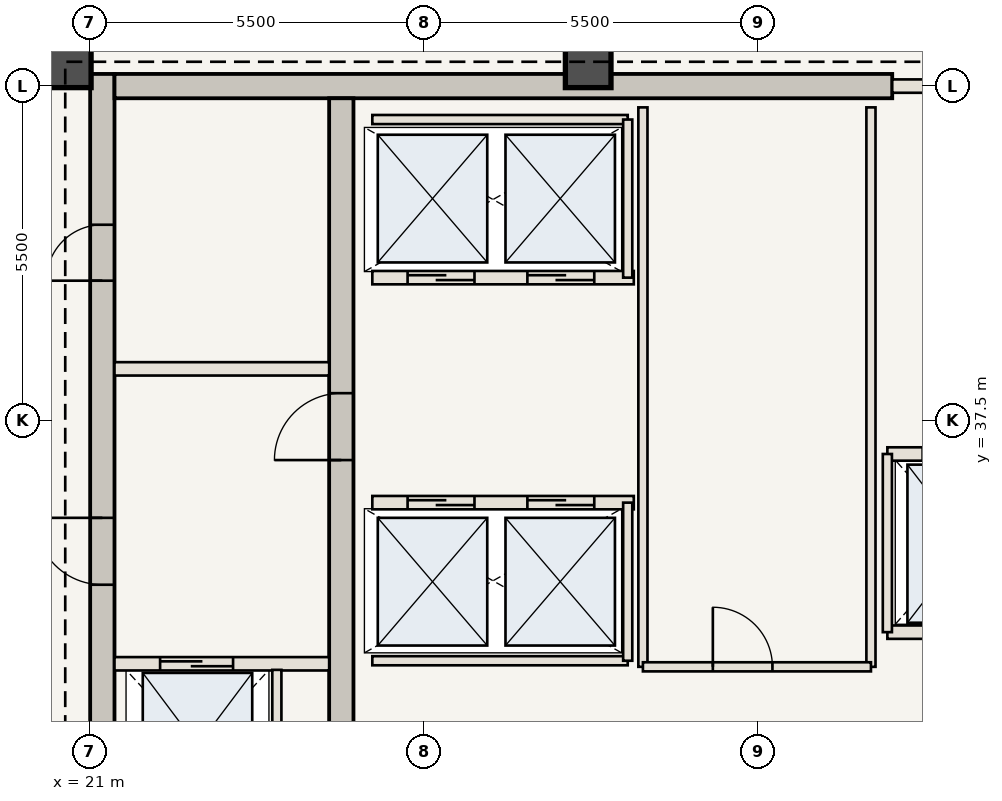
"""IFC4 building model, lengths in metres.
Left out: names, types, materials, properties, quantities, classifications, styles, units other than length and angle.
Written with IfcOpenShell. Run it as: python <this file> out.ifc"""

import sys

from ifc_helpers import new_model, si_unit, direction, frame, frame_2d, origin, origin_2d, place, context, subcontext, project, spatial, rectangle, extrude, element, fill, save


model = new_model("IFC4")
c1 = context("Model", 3, precision=1e-05, world=origin(), true_north=direction((0.0, 1.0)))
c2 = subcontext(c1, "Body", "Model", "MODEL_VIEW")
j1 = project(units=[si_unit("LENGTHUNIT", "METRE"), si_unit("PLANEANGLEUNIT", "RADIAN")], contexts=[c1])
p1 = place(None, origin())
s1 = spatial("IfcSite", under=j1, at=p1, CompositionType="ELEMENT")
p2 = place(p1, origin())
s2 = spatial("IfcBuilding", under=s1, at=p2, CompositionType="ELEMENT")
p3 = place(p2, frame((0.0, 0.0, 308.35)))
s3 = spatial("IfcBuildingStorey", under=s2, at=p3, CompositionType="ELEMENT", Elevation=308.35)
p4 = place(p3, frame((21.21, 30.6, 0.0), z_axis=(0.0, 0.0, 1.0), x_axis=(0.0, 1.0, 0.0)))
e1 = element("IfcWall", 1, at=p4, inside=s3, PredefinedType="SHEAR", context=c2, shape_type="SweptSolid", body=[
    extrude(rectangle(XDim=12.6, YDim=0.4, at=frame_2d((6.3, 0.0))), origin(), (0.0, 0.0, 1.0), 4.9),
])
p5 = place(p4, frame((4.2, 0.0, 0.0)))
e2 = element("IfcOpeningElement", 2, at=p5, cuts=e1, PredefinedType="OPENING", context=c2, shape_type="SweptSolid", body=[
    extrude(rectangle(XDim=1.1, YDim=2.15, at=frame_2d((0.55, 1.075))), frame((0.0, 0.21, 0.0), z_axis=(0.0, -1.0, 0.0), x_axis=(1.0, 0.0, 0.0)), (0.0, 0.0, 1.0), 0.42),
])
p6 = place(p4, frame((9.2, 0.0, 0.0)))
e3 = element("IfcOpeningElement", 3, at=p6, cuts=e1, PredefinedType="OPENING", context=c2, shape_type="SweptSolid", body=[
    extrude(rectangle(XDim=0.92, YDim=2.1, at=frame_2d((0.46, 1.05))), frame((0.0, 0.21, 0.0), z_axis=(0.0, -1.0, 0.0), x_axis=(1.0, 0.0, 0.0)), (0.0, 0.0, 1.0), 0.42),
])
p7 = place(p3, frame((21.41, 43.0, 0.0), z_axis=(0.0, 0.0, 1.0), x_axis=(1.0, 0.0, 0.0)))
e4 = element("IfcWall", 4, at=p7, inside=s3, PredefinedType="SHEAR", context=c2, shape_type="SweptSolid", body=[
    extrude(rectangle(XDim=12.79, YDim=0.4, at=frame_2d((6.395, 0.0))), origin(), (0.0, 0.0, 1.0), 4.9),
])
p8 = place(p3, frame((25.14, 30.6, 0.0), z_axis=(0.0, 0.0, 1.0), x_axis=(0.0, 1.0, 0.0)))
e5 = element("IfcWall", 5, at=p8, inside=s3, PredefinedType="SHEAR", context=c2, shape_type="SweptSolid", body=[
    extrude(rectangle(XDim=12.2, YDim=0.4, at=frame_2d((6.1, 0.0))), origin(), (0.0, 0.0, 1.0), 4.9),
])
p9 = place(p8, frame((6.25, 0.0, 0.0)))
e6 = element("IfcOpeningElement", 6, at=p9, cuts=e5, PredefinedType="OPENING", context=c2, shape_type="SweptSolid", body=[
    extrude(rectangle(XDim=1.1, YDim=2.15, at=frame_2d((0.55, 1.075))), frame((0.0, 0.21, 0.0), z_axis=(0.0, -1.0, 0.0), x_axis=(1.0, 0.0, 0.0)), (0.0, 0.0, 1.0), 0.42),
])
for number, where, z_axis, x_axis in (
    (7, (29.2, 43.35, 0.0), (0.0, 0.0, 1.0), (1.0, 0.0, 0.0)),
    (8, (20.65, 43.35, 0.0), (0.0, 0.0, 1.0), (1.0, 0.0, 0.0)),
):
    element("IfcColumn", number, at=place(p3, frame(where, z_axis=z_axis, x_axis=x_axis)), inside=s3, PredefinedType="COLUMN", context=c2, shape_type="SweptSolid", body=[
        extrude(rectangle(XDim=0.75, YDim=0.75, at=origin_2d()), origin(), (0.0, 0.0, 1.0), 4.9),
    ])
p10 = place(p3, frame((21.41, 33.5, 0.0), z_axis=(0.0, 0.0, 1.0), x_axis=(1.0, 0.0, 0.0)))
e9 = element("IfcWall", 9, at=p10, inside=s3, PredefinedType="STANDARD", context=c2, shape_type="SweptSolid", body=[
    extrude(rectangle(XDim=3.53, YDim=0.22, at=frame_2d((1.765, 0.0))), origin(), (0.0, 0.0, 1.0), 4.64),
])
p11 = place(p10, frame((0.75, 0.0, 0.0)))
e10 = element("IfcOpeningElement", 10, at=p11, cuts=e9, PredefinedType="OPENING", context=c2, shape_type="SweptSolid", body=[
    extrude(rectangle(XDim=1.2, YDim=2.2, at=frame_2d((0.6, 1.1))), frame((0.0, 0.12, 0.0), z_axis=(0.0, -1.0, 0.0), x_axis=(1.0, 0.0, 0.0)), (0.0, 0.0, 1.0), 0.24),
])
p12 = place(p3, frame((24.08, 30.75, 0.0), z_axis=(0.0, 0.0, 1.0), x_axis=(0.0, 1.0, 0.0)))
e11 = element("IfcWall", 11, at=p12, inside=s3, PredefinedType="STANDARD", context=c2, shape_type="SweptSolid", body=[
    extrude(rectangle(XDim=2.65, YDim=0.15, at=frame_2d((1.325, 0.0))), origin(), (0.0, 0.0, 1.0), 4.64),
])
p13 = place(p3, frame((21.41, 38.35, 0.0), z_axis=(0.0, 0.0, 1.0), x_axis=(1.0, 0.0, 0.0)))
e12 = element("IfcWall", 12, at=p13, inside=s3, PredefinedType="STANDARD", context=c2, shape_type="SweptSolid", body=[
    extrude(rectangle(XDim=3.53, YDim=0.22, at=frame_2d((1.765, 0.0))), origin(), (0.0, 0.0, 1.0), 4.64),
])
p14 = place(p3, frame((25.65, 36.15, 0.0), z_axis=(0.0, 0.0, 1.0), x_axis=(1.0, 0.0, 0.0)))
e13 = element("IfcWall", 13, at=p14, inside=s3, PredefinedType="STANDARD", context=c2, shape_type="SweptSolid", body=[
    extrude(rectangle(XDim=4.3, YDim=0.22, at=frame_2d((2.15, 0.0))), origin(), (0.0, 0.0, 1.0), 4.64),
])
p15 = place(p14, frame((0.58, 0.0, 0.0)))
e14 = element("IfcOpeningElement", 14, at=p15, cuts=e13, PredefinedType="OPENING", context=c2, shape_type="SweptSolid", body=[
    extrude(rectangle(XDim=1.1, YDim=2.15, at=frame_2d((0.55, 1.075))), frame((0.0, 0.12, 0.0), z_axis=(0.0, -1.0, 0.0), x_axis=(1.0, 0.0, 0.0)), (0.0, 0.0, 1.0), 0.24),
])
p16 = place(p14, frame((2.55, 0.0, 0.0)))
e15 = element("IfcOpeningElement", 15, at=p16, cuts=e13, PredefinedType="OPENING", context=c2, shape_type="SweptSolid", body=[
    extrude(rectangle(XDim=1.1, YDim=2.15, at=frame_2d((0.55, 1.075))), frame((0.0, 0.12, 0.0), z_axis=(0.0, -1.0, 0.0), x_axis=(1.0, 0.0, 0.0)), (0.0, 0.0, 1.0), 0.24),
])
p17 = place(p3, frame((25.65, 33.55, 0.0), z_axis=(0.0, 0.0, 1.0), x_axis=(1.0, 0.0, 0.0)))
e16 = element("IfcWall", 16, at=p17, inside=s3, PredefinedType="STANDARD", context=c2, shape_type="SweptSolid", body=[
    extrude(rectangle(XDim=4.2, YDim=0.15, at=frame_2d((2.1, 0.0))), origin(), (0.0, 0.0, 1.0), 4.64),
])
p18 = place(p3, frame((29.85, 33.55, 0.0), z_axis=(0.0, 0.0, 1.0), x_axis=(0.0, 1.0, 0.0)))
e17 = element("IfcWall", 17, at=p18, inside=s3, PredefinedType="STANDARD", context=c2, shape_type="SweptSolid", body=[
    extrude(rectangle(XDim=2.6, YDim=0.15, at=frame_2d((1.3, 0.0))), origin(), (0.0, 0.0, 1.0), 4.64),
])
p19 = place(p3, frame((25.65, 39.85, 0.0), z_axis=(0.0, 0.0, 1.0), x_axis=(1.0, 0.0, 0.0)))
e18 = element("IfcWall", 18, at=p19, inside=s3, PredefinedType="STANDARD", context=c2, shape_type="SweptSolid", body=[
    extrude(rectangle(XDim=4.3, YDim=0.22, at=frame_2d((2.15, 0.0))), origin(), (0.0, 0.0, 1.0), 4.64),
])
p20 = place(p19, frame((0.58, 0.0, 0.0)))
e19 = element("IfcOpeningElement", 19, at=p20, cuts=e18, PredefinedType="OPENING", context=c2, shape_type="SweptSolid", body=[
    extrude(rectangle(XDim=1.1, YDim=2.15, at=frame_2d((0.55, 1.075))), frame((0.0, 0.12, 0.0), z_axis=(0.0, -1.0, 0.0), x_axis=(1.0, 0.0, 0.0)), (0.0, 0.0, 1.0), 0.24),
])
p21 = place(p19, frame((2.55, 0.0, 0.0)))
e20 = element("IfcOpeningElement", 20, at=p21, cuts=e18, PredefinedType="OPENING", context=c2, shape_type="SweptSolid", body=[
    extrude(rectangle(XDim=1.1, YDim=2.15, at=frame_2d((0.55, 1.075))), frame((0.0, 0.12, 0.0), z_axis=(0.0, -1.0, 0.0), x_axis=(1.0, 0.0, 0.0)), (0.0, 0.0, 1.0), 0.24),
])
p22 = place(p3, frame((25.65, 42.45, 0.0), z_axis=(0.0, 0.0, 1.0), x_axis=(1.0, 0.0, 0.0)))
e21 = element("IfcWall", 21, at=p22, inside=s3, PredefinedType="STANDARD", context=c2, shape_type="SweptSolid", body=[
    extrude(rectangle(XDim=4.2, YDim=0.15, at=frame_2d((2.1, 0.0))), origin(), (0.0, 0.0, 1.0), 4.64),
])
p23 = place(p3, frame((29.85, 39.85, 0.0), z_axis=(0.0, 0.0, 1.0), x_axis=(0.0, 1.0, 0.0)))
e22 = element("IfcWall", 22, at=p23, inside=s3, PredefinedType="STANDARD", context=c2, shape_type="SweptSolid", body=[
    extrude(rectangle(XDim=2.6, YDim=0.15, at=frame_2d((1.3, 0.0))), origin(), (0.0, 0.0, 1.0), 4.64),
])
for number, where, z_axis, x_axis in (
    (23, (30.1, 33.45, 0.0), (0.0, 0.0, 1.0), (0.0, 1.0, 0.0)),
    (24, (33.85, 33.45, 0.0), (0.0, 0.0, 1.0), (0.0, 1.0, 0.0)),
):
    element("IfcWall", number, at=place(p3, frame(where, z_axis=z_axis, x_axis=x_axis)), inside=s3, PredefinedType="STANDARD", context=c2, shape_type="SweptSolid", body=[
        extrude(rectangle(XDim=9.2, YDim=0.15, at=frame_2d((4.6, 0.0))), origin(), (0.0, 0.0, 1.0), 4.64),
    ])
p24 = place(p3, frame((30.1, 33.45, 0.0), z_axis=(0.0, 0.0, 1.0), x_axis=(1.0, 0.0, 0.0)))
e25 = element("IfcWall", 25, at=p24, inside=s3, PredefinedType="STANDARD", context=c2, shape_type="SweptSolid", body=[
    extrude(rectangle(XDim=3.75, YDim=0.15, at=frame_2d((1.875, 0.0))), origin(), (0.0, 0.0, 1.0), 4.64),
])
p25 = place(p24, frame((1.15, 0.0, 0.0)))
e26 = element("IfcOpeningElement", 26, at=p25, cuts=e25, PredefinedType="OPENING", context=c2, shape_type="SweptSolid", body=[
    extrude(rectangle(XDim=0.98, YDim=2.2, at=frame_2d((0.49, 1.1))), frame((0.0, 0.085, 0.0), z_axis=(0.0, -1.0, 0.0), x_axis=(1.0, 0.0, 0.0)), (0.0, 0.0, 1.0), 0.17),
])
p26 = place(p3, frame((34.2, 43.0, 0.0), z_axis=(0.0, 0.0, 1.0), x_axis=(1.0, 0.0, 0.0)))
e27 = element("IfcWall", 27, at=p26, inside=s3, PredefinedType="STANDARD", context=c2, shape_type="SweptSolid", body=[
    extrude(rectangle(XDim=3.55, YDim=0.22, at=frame_2d((1.775, 0.0))), origin(), (0.0, 0.0, 1.0), 4.64),
])
p27 = place(p26, frame((1.4, 0.0, 0.0)))
e28 = element("IfcOpeningElement", 28, at=p27, cuts=e27, PredefinedType="OPENING", context=c2, shape_type="SweptSolid", body=[
    extrude(rectangle(XDim=1.1, YDim=2.15, at=frame_2d((0.55, 1.075))), frame((0.0, 0.12, 0.0), z_axis=(0.0, -1.0, 0.0), x_axis=(1.0, 0.0, 0.0)), (0.0, 0.0, 1.0), 0.24),
])
p28 = place(p3, frame((34.12, 36.95, 0.0), z_axis=(0.0, 0.0, 1.0), x_axis=(1.0, 0.0, 0.0)))
e29 = element("IfcWall", 29, at=p28, inside=s3, PredefinedType="STANDARD", context=c2, shape_type="SweptSolid", body=[
    extrude(rectangle(XDim=2.68, YDim=0.22, at=frame_2d((1.34, 0.0))), origin(), (0.0, 0.0, 1.0), 4.64),
])
p29 = place(p28, frame((0.58, 0.0, 0.0)))
e30 = element("IfcOpeningElement", 30, at=p29, cuts=e29, PredefinedType="OPENING", context=c2, shape_type="SweptSolid", body=[
    extrude(rectangle(XDim=1.2, YDim=2.2, at=frame_2d((0.6, 1.1))), frame((0.0, 0.12, 0.0), z_axis=(0.0, -1.0, 0.0), x_axis=(1.0, 0.0, 0.0)), (0.0, 0.0, 1.0), 0.24),
])
p30 = place(p3, frame((34.12, 34.02, 0.0), z_axis=(0.0, 0.0, 1.0), x_axis=(1.0, 0.0, 0.0)))
e31 = element("IfcWall", 31, at=p30, inside=s3, PredefinedType="STANDARD", context=c2, shape_type="SweptSolid", body=[
    extrude(rectangle(XDim=2.68, YDim=0.22, at=frame_2d((1.34, 0.0))), origin(), (0.0, 0.0, 1.0), 4.64),
])
p31 = place(p3, frame((34.12, 34.02, 0.0), z_axis=(0.0, 0.0, 1.0), x_axis=(0.0, 1.0, 0.0)))
e32 = element("IfcWall", 32, at=p31, inside=s3, PredefinedType="STANDARD", context=c2, shape_type="SweptSolid", body=[
    extrude(rectangle(XDim=2.93, YDim=0.15, at=frame_2d((1.465, 0.0))), origin(), (0.0, 0.0, 1.0), 4.64),
])
p32 = place(p5, origin())
e33 = element("IfcDoor", 33, at=p32, inside=s3, OperationType="SINGLE_SWING_RIGHT", PredefinedType="DOOR", context=c2, shape_type="SweptSolid", body=[
    extrude(rectangle(XDim=1.1, YDim=2.15, at=frame_2d((0.55, 1.075))), frame((0.0, 0.025, 0.0), z_axis=(0.0, -1.0, 0.0), x_axis=(1.0, 0.0, 0.0)), (0.0, 0.0, 1.0), 0.05),
])
fill(e2, e33)
p33 = place(p9, origin())
e34 = element("IfcDoor", 34, at=p33, inside=s3, OperationType="SINGLE_SWING_LEFT", PredefinedType="DOOR", context=c2, shape_type="SweptSolid", body=[
    extrude(rectangle(XDim=1.1, YDim=2.15, at=frame_2d((0.55, 1.075))), frame((0.0, 0.025, 0.0), z_axis=(0.0, -1.0, 0.0), x_axis=(1.0, 0.0, 0.0)), (0.0, 0.0, 1.0), 0.05),
])
fill(e6, e34)
p34 = place(p6, origin())
e35 = element("IfcDoor", 35, at=p34, inside=s3, OperationType="SINGLE_SWING_LEFT", PredefinedType="DOOR", context=c2, shape_type="SweptSolid", body=[
    extrude(rectangle(XDim=0.92, YDim=2.1, at=frame_2d((0.46, 1.05))), frame((0.0, 0.025, 0.0), z_axis=(0.0, -1.0, 0.0), x_axis=(1.0, 0.0, 0.0)), (0.0, 0.0, 1.0), 0.05),
])
fill(e3, e35)
p35 = place(p11, origin())
e36 = element("IfcDoor", 36, at=p35, inside=s3, OperationType="DOUBLE_DOOR_SLIDING", PredefinedType="DOOR", context=c2, shape_type="SweptSolid", body=[
    extrude(rectangle(XDim=1.2, YDim=2.2, at=frame_2d((0.6, 1.1))), frame((0.0, 0.025, 0.0), z_axis=(0.0, -1.0, 0.0), x_axis=(1.0, 0.0, 0.0)), (0.0, 0.0, 1.0), 0.05),
])
fill(e10, e36)
p36 = place(p15, origin())
e37 = element("IfcDoor", 37, at=p36, inside=s3, OperationType="DOUBLE_DOOR_SLIDING", PredefinedType="DOOR", context=c2, shape_type="SweptSolid", body=[
    extrude(rectangle(XDim=1.1, YDim=2.15, at=frame_2d((0.55, 1.075))), frame((0.0, 0.025, 0.0), z_axis=(0.0, -1.0, 0.0), x_axis=(1.0, 0.0, 0.0)), (0.0, 0.0, 1.0), 0.05),
])
fill(e14, e37)
p37 = place(p16, origin())
e38 = element("IfcDoor", 38, at=p37, inside=s3, OperationType="DOUBLE_DOOR_SLIDING", PredefinedType="DOOR", context=c2, shape_type="SweptSolid", body=[
    extrude(rectangle(XDim=1.1, YDim=2.15, at=frame_2d((0.55, 1.075))), frame((0.0, 0.025, 0.0), z_axis=(0.0, -1.0, 0.0), x_axis=(1.0, 0.0, 0.0)), (0.0, 0.0, 1.0), 0.05),
])
fill(e15, e38)
p38 = place(p20, origin())
e39 = element("IfcDoor", 39, at=p38, inside=s3, OperationType="DOUBLE_DOOR_SLIDING", PredefinedType="DOOR", context=c2, shape_type="SweptSolid", body=[
    extrude(rectangle(XDim=1.1, YDim=2.15, at=frame_2d((0.55, 1.075))), frame((0.0, 0.025, 0.0), z_axis=(0.0, -1.0, 0.0), x_axis=(1.0, 0.0, 0.0)), (0.0, 0.0, 1.0), 0.05),
])
fill(e19, e39)
p39 = place(p21, origin())
e40 = element("IfcDoor", 40, at=p39, inside=s3, OperationType="DOUBLE_DOOR_SLIDING", PredefinedType="DOOR", context=c2, shape_type="SweptSolid", body=[
    extrude(rectangle(XDim=1.1, YDim=2.15, at=frame_2d((0.55, 1.075))), frame((0.0, 0.025, 0.0), z_axis=(0.0, -1.0, 0.0), x_axis=(1.0, 0.0, 0.0)), (0.0, 0.0, 1.0), 0.05),
])
fill(e20, e40)
p40 = place(p25, origin())
e41 = element("IfcDoor", 41, at=p40, inside=s3, OperationType="SINGLE_SWING_LEFT", PredefinedType="DOOR", context=c2, shape_type="SweptSolid", body=[
    extrude(rectangle(XDim=0.98, YDim=2.2, at=frame_2d((0.49, 1.1))), frame((0.0, 0.025, 0.0), z_axis=(0.0, -1.0, 0.0), x_axis=(1.0, 0.0, 0.0)), (0.0, 0.0, 1.0), 0.05),
])
fill(e26, e41)
save(model, sys.argv[1])
